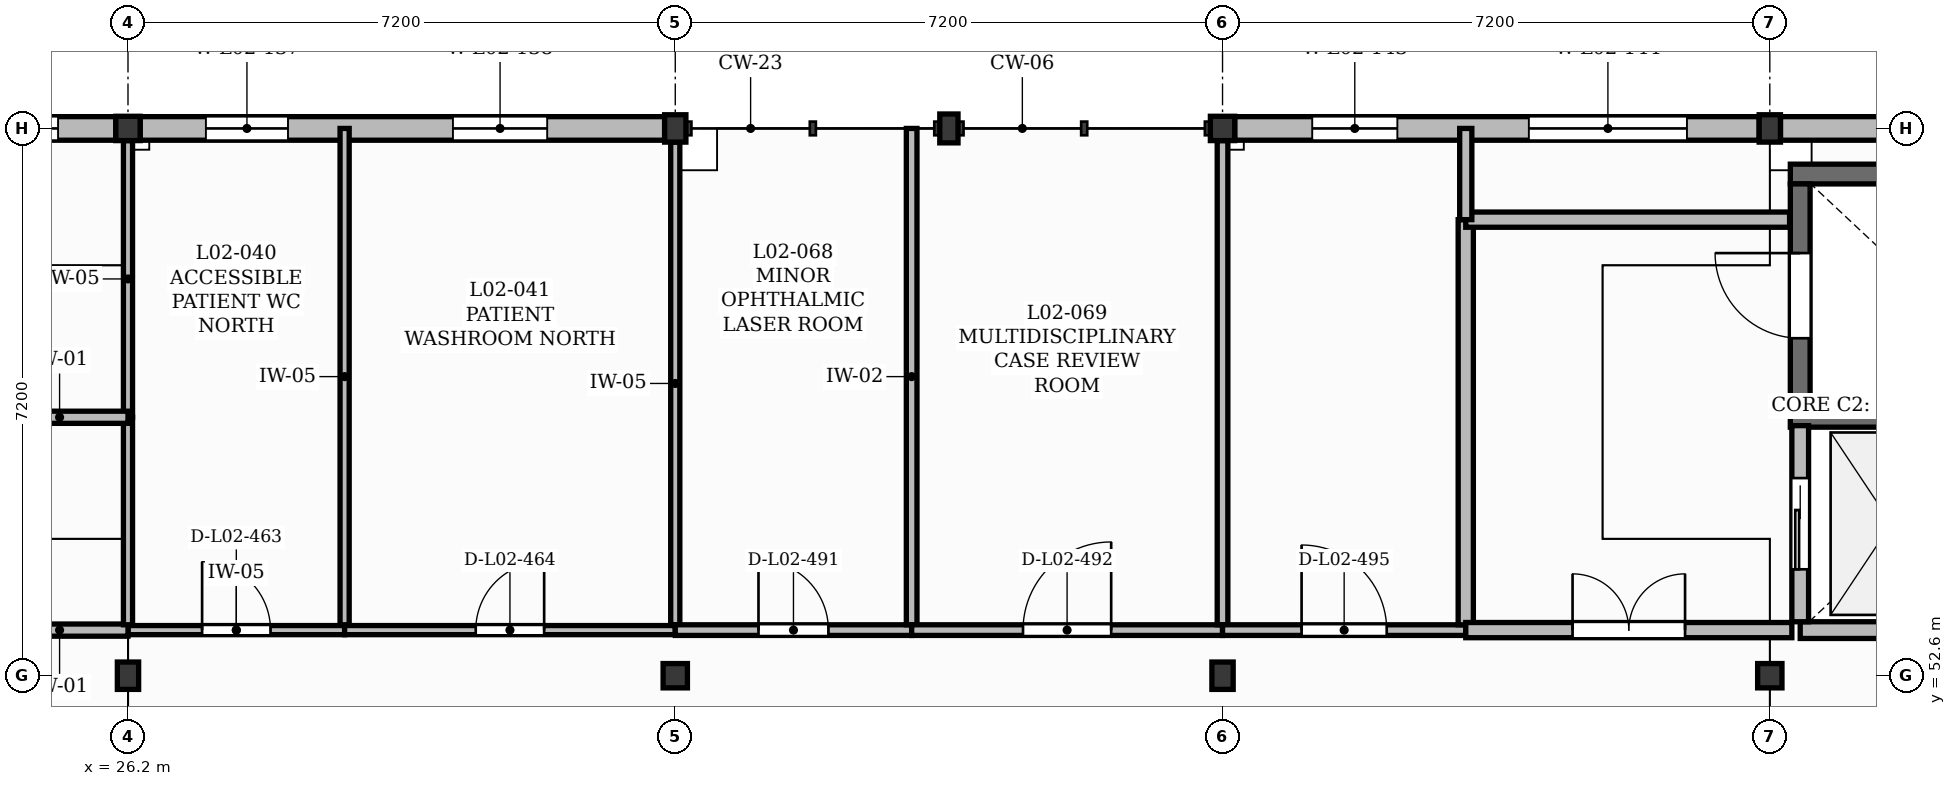
"""IFC4 building model, lengths in metres.
Left out: names, types, materials, properties, quantities, classifications, styles, units other than length and angle.
Written with IfcOpenShell. Run it as: python <this file> out.ifc"""

import sys

from ifc_helpers import new_model, si_unit, direction, frame, frame_2d, origin, origin_2d, place, context, subcontext, project, spatial, rectangle, extrude, element, fill, save


model = new_model("IFC4")
c1 = context("Model", 3, precision=1e-05, world=origin(), true_north=direction((0.0, 1.0)))
c2 = subcontext(c1, "Body", "Model", "MODEL_VIEW")
j1 = project(units=[si_unit("LENGTHUNIT", "METRE"), si_unit("PLANEANGLEUNIT", "RADIAN")], contexts=[c1])
p1 = place(None, origin())
s1 = spatial("IfcSite", under=j1, at=p1, CompositionType="ELEMENT")
p2 = place(p1, origin())
s2 = spatial("IfcBuilding", under=s1, at=p2, CompositionType="ELEMENT")
p3 = place(p2, frame((0.0, 0.0, 9.0)))
s3 = spatial("IfcBuildingStorey", under=s2, at=p3, CompositionType="ELEMENT", Elevation=9.0)
p4 = place(p3, frame((26.2, 52.6, 0.0), z_axis=(0.0, 0.0, 1.0), x_axis=(1.0, 0.0, 0.0)))
e1 = element("IfcColumn", 1, at=p4, inside=s3, PredefinedType="COLUMN", context=c2, shape_type="SweptSolid", body=[
    extrude(rectangle(XDim=0.28, YDim=0.36, at=origin_2d()), origin(), (0.0, 0.0, 1.0), 3.99),
])
for number, where, z_axis, x_axis in (
    (2, (26.2, 59.8, 0.0), (0.0, 0.0, 1.0), (1.0, 0.0, 0.0)),
    (3, (33.4, 52.6, 0.0), (0.0, 0.0, 1.0), (1.0, 0.0, 0.0)),
):
    element("IfcColumn", number, at=place(p3, frame(where, z_axis=z_axis, x_axis=x_axis)), inside=s3, PredefinedType="COLUMN", context=c2, shape_type="SweptSolid", body=[
        extrude(rectangle(XDim=0.32, YDim=0.32, at=origin_2d()), origin(), (0.0, 0.0, 1.0), 3.99),
    ])
for number, where, z_axis, x_axis in (
    (4, (33.4, 59.8, 0.0), (0.0, 0.0, 1.0), (1.0, 0.0, 0.0)),
    (5, (40.6, 52.6, 0.0), (0.0, 0.0, 1.0), (1.0, 0.0, 0.0)),
):
    element("IfcColumn", number, at=place(p3, frame(where, z_axis=z_axis, x_axis=x_axis)), inside=s3, PredefinedType="COLUMN", context=c2, shape_type="SweptSolid", body=[
        extrude(rectangle(XDim=0.28, YDim=0.36, at=origin_2d()), origin(), (0.0, 0.0, 1.0), 3.99),
    ])
for number, where, z_axis, x_axis in (
    (6, (40.6, 59.8, 0.0), (0.0, 0.0, 1.0), (1.0, 0.0, 0.0)),
    (7, (47.8, 52.6, 0.0), (0.0, 0.0, 1.0), (1.0, 0.0, 0.0)),
):
    element("IfcColumn", number, at=place(p3, frame(where, z_axis=z_axis, x_axis=x_axis)), inside=s3, PredefinedType="COLUMN", context=c2, shape_type="SweptSolid", body=[
        extrude(rectangle(XDim=0.32, YDim=0.32, at=origin_2d()), origin(), (0.0, 0.0, 1.0), 3.99),
    ])
p5 = place(p3, frame((47.8, 59.8, 0.0), z_axis=(0.0, 0.0, 1.0), x_axis=(1.0, 0.0, 0.0)))
e8 = element("IfcColumn", 8, at=p5, inside=s3, PredefinedType="COLUMN", context=c2, shape_type="SweptSolid", body=[
    extrude(rectangle(XDim=0.28, YDim=0.36, at=origin_2d()), origin(), (0.0, 0.0, 1.0), 3.99),
])
p6 = place(p3, frame((37.0, 59.8, 0.0), z_axis=(0.0, 0.0, 1.0), x_axis=(1.0, 0.0, 0.0)))
e9 = element("IfcColumn", 9, at=p6, inside=s3, PredefinedType="PILASTER", context=c2, shape_type="SweptSolid", body=[
    extrude(rectangle(XDim=0.24, YDim=0.38, at=origin_2d()), origin(), (0.0, 0.0, 1.0), 3.99),
])
p7 = place(p3, frame((22.72, 59.8, 0.0), z_axis=(0.0, 0.0, 1.0), x_axis=(1.0, 0.0, 0.0)))
e10 = element("IfcWall", 10, at=p7, inside=s3, PredefinedType="SOLIDWALL", context=c2, shape_type="SweptSolid", body=[
    extrude(rectangle(XDim=3.32, YDim=0.31, at=frame_2d((1.66, 0.0))), origin(), (0.0, 0.0, 1.0), 3.53),
])
p8 = place(p7, frame((0.76, 0.0, 1.0)))
e11 = element("IfcOpeningElement", 11, at=p8, cuts=e10, PredefinedType="OPENING", context=c2, shape_type="SweptSolid", body=[
    extrude(rectangle(XDim=1.8, YDim=1.8, at=frame_2d((0.9, 0.9))), frame((0.0, 0.165, 0.0), z_axis=(0.0, -1.0, 0.0), x_axis=(1.0, 0.0, 0.0)), (0.0, 0.0, 1.0), 0.33),
])
p9 = place(p3, frame((26.36, 59.8, 0.0), z_axis=(0.0, 0.0, 1.0), x_axis=(1.0, 0.0, 0.0)))
e12 = element("IfcWall", 12, at=p9, inside=s3, PredefinedType="SOLIDWALL", context=c2, shape_type="SweptSolid", body=[
    extrude(rectangle(XDim=6.9, YDim=0.31, at=frame_2d((3.45, 0.0))), origin(), (0.0, 0.0, 1.0), 3.53),
])
p10 = place(p9, frame((0.865, 0.0, 1.0)))
e13 = element("IfcOpeningElement", 13, at=p10, cuts=e12, PredefinedType="OPENING", context=c2, shape_type="SweptSolid", body=[
    extrude(rectangle(XDim=1.08, YDim=1.95, at=frame_2d((0.54, 0.975))), frame((0.0, 0.165, 0.0), z_axis=(0.0, -1.0, 0.0), x_axis=(1.0, 0.0, 0.0)), (0.0, 0.0, 1.0), 0.33),
])
p11 = place(p9, frame((4.115, 0.0, 1.0)))
e14 = element("IfcOpeningElement", 14, at=p11, cuts=e12, PredefinedType="OPENING", context=c2, shape_type="SweptSolid", body=[
    extrude(rectangle(XDim=1.24, YDim=1.8, at=frame_2d((0.62, 0.9))), frame((0.0, 0.165, 0.0), z_axis=(0.0, -1.0, 0.0), x_axis=(1.0, 0.0, 0.0)), (0.0, 0.0, 1.0), 0.33),
])
p12 = place(p3, frame((40.76, 59.8, 0.0), z_axis=(0.0, 0.0, 1.0), x_axis=(1.0, 0.0, 0.0)))
e15 = element("IfcWall", 15, at=p12, inside=s3, PredefinedType="SOLIDWALL", context=c2, shape_type="SweptSolid", body=[
    extrude(rectangle(XDim=6.9, YDim=0.31, at=frame_2d((3.45, 0.0))), origin(), (0.0, 0.0, 1.0), 3.53),
])
p13 = place(p12, frame((1.02, 0.0, 1.05)))
e16 = element("IfcOpeningElement", 16, at=p13, cuts=e15, PredefinedType="OPENING", context=c2, shape_type="SweptSolid", body=[
    extrude(rectangle(XDim=1.12, YDim=1.65, at=frame_2d((0.56, 0.825))), frame((0.0, 0.165, 0.0), z_axis=(0.0, -1.0, 0.0), x_axis=(1.0, 0.0, 0.0)), (0.0, 0.0, 1.0), 0.33),
])
p14 = place(p12, frame((3.87, 0.0, 1.0)))
e17 = element("IfcOpeningElement", 17, at=p14, cuts=e15, PredefinedType="OPENING", context=c2, shape_type="SweptSolid", body=[
    extrude(rectangle(XDim=2.08, YDim=1.8, at=frame_2d((1.04, 0.9))), frame((0.0, 0.165, 0.0), z_axis=(0.0, -1.0, 0.0), x_axis=(1.0, 0.0, 0.0)), (0.0, 0.0, 1.0), 0.33),
])
p15 = place(p3, frame((47.94, 59.8, 0.0), z_axis=(0.0, 0.0, 1.0), x_axis=(1.0, 0.0, 0.0)))
e18 = element("IfcWall", 18, at=p15, inside=s3, PredefinedType="SOLIDWALL", context=c2, shape_type="SweptSolid", body=[
    extrude(rectangle(XDim=3.34, YDim=0.31, at=frame_2d((1.67, 0.0))), origin(), (0.0, 0.0, 1.0), 3.53),
])
for number, where, z_axis, x_axis in (
    (19, (48.07, 56.0, 0.0), (0.0, 0.0, 1.0), (1.0, 0.0, 0.0)),
    (20, (48.07, 59.2, 0.0), (0.0, 0.0, 1.0), (1.0, 0.0, 0.0)),
):
    element("IfcWall", number, at=place(p3, frame(where, z_axis=z_axis, x_axis=x_axis)), inside=s3, PredefinedType="SHEAR", context=c2, shape_type="SweptSolid", body=[
        extrude(rectangle(XDim=6.66, YDim=0.26, at=frame_2d((3.33, 0.0))), origin(), (0.0, 0.0, 1.0), 3.95),
    ])
p16 = place(p3, frame((48.2, 56.13, 0.0), z_axis=(0.0, 0.0, 1.0), x_axis=(0.0, 1.0, 0.0)))
e21 = element("IfcWall", 21, at=p16, inside=s3, PredefinedType="SHEAR", context=c2, shape_type="SweptSolid", body=[
    extrude(rectangle(XDim=2.94, YDim=0.26, at=frame_2d((1.47, 0.0))), origin(), (0.0, 0.0, 1.0), 3.95),
])
p17 = place(p16, frame((0.91, 0.0, 0.0)))
e22 = element("IfcOpeningElement", 22, at=p17, cuts=e21, PredefinedType="OPENING", context=c2, shape_type="SweptSolid", body=[
    extrude(rectangle(XDim=1.12, YDim=2.1, at=frame_2d((0.56, 1.05))), frame((0.0, 0.14, 0.0), z_axis=(0.0, -1.0, 0.0), x_axis=(1.0, 0.0, 0.0)), (0.0, 0.0, 1.0), 0.28),
])
p18 = place(p3, frame((48.2, 53.2, 0.0), z_axis=(0.0, 0.0, 1.0), x_axis=(1.0, 0.0, 0.0)))
e23 = element("IfcWall", 23, at=p18, inside=s3, PredefinedType="SOLIDWALL", context=c2, shape_type="SweptSolid", body=[
    extrude(rectangle(XDim=2.4, YDim=0.22, at=frame_2d((1.2, 0.0))), origin(), (0.0, 0.0, 1.0), 3.95),
])
p19 = place(p3, frame((48.2, 53.31, 0.0), z_axis=(0.0, 0.0, 1.0), x_axis=(0.0, 1.0, 0.0)))
e24 = element("IfcWall", 24, at=p19, inside=s3, PredefinedType="SOLIDWALL", context=c2, shape_type="SweptSolid", body=[
    extrude(rectangle(XDim=2.58, YDim=0.22, at=frame_2d((1.29, 0.0))), origin(), (0.0, 0.0, 1.0), 3.95),
])
p20 = place(p19, frame((0.69, 0.0, 0.0)))
e25 = element("IfcOpeningElement", 25, at=p20, cuts=e24, PredefinedType="OPENING", context=c2, shape_type="SweptSolid", body=[
    extrude(rectangle(XDim=1.2, YDim=2.15, at=frame_2d((0.6, 1.075))), frame((0.0, 0.12, 0.0), z_axis=(0.0, -1.0, 0.0), x_axis=(1.0, 0.0, 0.0)), (0.0, 0.0, 1.0), 0.24),
])
p21 = place(p3, frame((26.2, 53.2, 0.0), z_axis=(0.0, 0.0, 1.0), x_axis=(1.0, 0.0, 0.0)))
e26 = element("IfcWall", 26, at=p21, inside=s3, PredefinedType="PLUMBINGWALL", context=c2, shape_type="SweptSolid", body=[
    extrude(rectangle(XDim=2.85, YDim=0.12, at=frame_2d((1.425, 0.0))), origin(), (0.0, 0.0, 1.0), 3.96),
])
p22 = place(p21, frame((0.975, 0.0, 0.0)))
e27 = element("IfcOpeningElement", 27, at=p22, cuts=e26, PredefinedType="OPENING", context=c2, shape_type="SweptSolid", body=[
    extrude(rectangle(XDim=0.9, YDim=2.1, at=frame_2d((0.45, 1.05))), frame((0.0, 0.07, 0.0), z_axis=(0.0, -1.0, 0.0), x_axis=(1.0, 0.0, 0.0)), (0.0, 0.0, 1.0), 0.14),
])
p23 = place(p3, frame((26.2, 56.0, 0.0), z_axis=(0.0, 0.0, 1.0), x_axis=(0.0, 1.0, 0.0)))
e28 = element("IfcWall", 28, at=p23, inside=s3, PredefinedType="PLUMBINGWALL", context=c2, shape_type="SweptSolid", body=[
    extrude(rectangle(XDim=3.64, YDim=0.12, at=frame_2d((1.82, 0.0))), origin(), (0.0, 0.0, 1.0), 3.47),
])
p24 = place(p3, frame((29.05, 53.27, 0.0), z_axis=(0.0, 0.0, 1.0), x_axis=(0.0, 1.0, 0.0)))
e29 = element("IfcWall", 29, at=p24, inside=s3, PredefinedType="PLUMBINGWALL", context=c2, shape_type="SweptSolid", body=[
    extrude(rectangle(XDim=6.53, YDim=0.12, at=frame_2d((3.265, 0.0))), origin(), (0.0, 0.0, 1.0), 3.96),
])
p25 = place(p3, frame((29.05, 53.2, 0.0), z_axis=(0.0, 0.0, 1.0), x_axis=(1.0, 0.0, 0.0)))
e30 = element("IfcWall", 30, at=p25, inside=s3, PredefinedType="PLUMBINGWALL", context=c2, shape_type="SweptSolid", body=[
    extrude(rectangle(XDim=4.35, YDim=0.12, at=frame_2d((2.175, 0.0))), origin(), (0.0, 0.0, 1.0), 3.96),
])
p26 = place(p25, frame((1.725, 0.0, 0.0)))
e31 = element("IfcOpeningElement", 31, at=p26, cuts=e30, PredefinedType="OPENING", context=c2, shape_type="SweptSolid", body=[
    extrude(rectangle(XDim=0.9, YDim=2.1, at=frame_2d((0.45, 1.05))), frame((0.0, 0.07, 0.0), z_axis=(0.0, -1.0, 0.0), x_axis=(1.0, 0.0, 0.0)), (0.0, 0.0, 1.0), 0.14),
])
p27 = place(p3, frame((33.4, 53.27, 0.0), z_axis=(0.0, 0.0, 1.0), x_axis=(0.0, 1.0, 0.0)))
e32 = element("IfcWall", 32, at=p27, inside=s3, PredefinedType="PLUMBINGWALL", context=c2, shape_type="SweptSolid", body=[
    extrude(rectangle(XDim=6.35, YDim=0.12, at=frame_2d((3.175, 0.0))), origin(), (0.0, 0.0, 1.0), 3.47),
])
p28 = place(p3, frame((33.4, 53.2, 0.0), z_axis=(0.0, 0.0, 1.0), x_axis=(1.0, 0.0, 0.0)))
e33 = element("IfcWall", 33, at=p28, inside=s3, PredefinedType="PARTITIONING", context=c2, shape_type="SweptSolid", body=[
    extrude(rectangle(XDim=3.11, YDim=0.14, at=frame_2d((1.555, 0.0))), origin(), (0.0, 0.0, 1.0), 3.96),
])
p29 = place(p28, frame((1.095, 0.0, 0.0)))
e34 = element("IfcOpeningElement", 34, at=p29, cuts=e33, PredefinedType="OPENING", context=c2, shape_type="SweptSolid", body=[
    extrude(rectangle(XDim=0.92, YDim=2.1, at=frame_2d((0.46, 1.05))), frame((0.0, 0.08, 0.0), z_axis=(0.0, -1.0, 0.0), x_axis=(1.0, 0.0, 0.0)), (0.0, 0.0, 1.0), 0.16),
])
p30 = place(p3, frame((36.51, 53.27, 0.0), z_axis=(0.0, 0.0, 1.0), x_axis=(0.0, 1.0, 0.0)))
e35 = element("IfcWall", 35, at=p30, inside=s3, PredefinedType="PARTITIONING", context=c2, shape_type="SweptSolid", body=[
    extrude(rectangle(XDim=6.53, YDim=0.14, at=frame_2d((3.265, 0.0))), origin(), (0.0, 0.0, 1.0), 3.96),
])
p31 = place(p3, frame((36.51, 53.2, 0.0), z_axis=(0.0, 0.0, 1.0), x_axis=(1.0, 0.0, 0.0)))
e36 = element("IfcWall", 36, at=p31, inside=s3, PredefinedType="PARTITIONING", context=c2, shape_type="SweptSolid", body=[
    extrude(rectangle(XDim=4.09, YDim=0.14, at=frame_2d((2.045, 0.0))), origin(), (0.0, 0.0, 1.0), 3.96),
])
p32 = place(p31, frame((1.465, 0.0, 0.0)))
e37 = element("IfcOpeningElement", 37, at=p32, cuts=e36, PredefinedType="OPENING", context=c2, shape_type="SweptSolid", body=[
    extrude(rectangle(XDim=1.16, YDim=2.1, at=frame_2d((0.58, 1.05))), frame((0.0, 0.08, 0.0), z_axis=(0.0, -1.0, 0.0), x_axis=(1.0, 0.0, 0.0)), (0.0, 0.0, 1.0), 0.16),
])
p33 = place(p3, frame((40.6, 53.27, 0.0), z_axis=(0.0, 0.0, 1.0), x_axis=(0.0, 1.0, 0.0)))
e38 = element("IfcWall", 38, at=p33, inside=s3, PredefinedType="PARTITIONING", context=c2, shape_type="SweptSolid", body=[
    extrude(rectangle(XDim=6.37, YDim=0.14, at=frame_2d((3.185, 0.0))), origin(), (0.0, 0.0, 1.0), 3.47),
])
p34 = place(p3, frame((40.6, 53.2, 0.0), z_axis=(0.0, 0.0, 1.0), x_axis=(1.0, 0.0, 0.0)))
e39 = element("IfcWall", 39, at=p34, inside=s3, PredefinedType="PARTITIONING", context=c2, shape_type="SweptSolid", body=[
    extrude(rectangle(XDim=3.2, YDim=0.14, at=frame_2d((1.6, 0.0))), origin(), (0.0, 0.0, 1.0), 3.96),
])
p35 = place(p34, frame((1.04, 0.0, 0.0)))
e40 = element("IfcOpeningElement", 40, at=p35, cuts=e39, PredefinedType="OPENING", context=c2, shape_type="SweptSolid", body=[
    extrude(rectangle(XDim=1.12, YDim=2.15, at=frame_2d((0.56, 1.075))), frame((0.0, 0.08, 0.0), z_axis=(0.0, -1.0, 0.0), x_axis=(1.0, 0.0, 0.0)), (0.0, 0.0, 1.0), 0.16),
])
p36 = place(p3, frame((43.8, 53.27, 0.0), z_axis=(0.0, 0.0, 1.0), x_axis=(0.0, 1.0, 0.0)))
e41 = element("IfcWall", 41, at=p36, inside=s3, PredefinedType="PARTITIONING", context=c2, shape_type="SweptSolid", body=[
    extrude(rectangle(XDim=5.33, YDim=0.2, at=frame_2d((2.665, 0.0))), origin(), (0.0, 0.0, 1.0), 3.96),
])
p37 = place(p3, frame((43.8, 53.2, 0.0), z_axis=(0.0, 0.0, 1.0), x_axis=(1.0, 0.0, 0.0)))
e42 = element("IfcWall", 42, at=p37, inside=s3, PredefinedType="PARTITIONING", context=c2, shape_type="SweptSolid", body=[
    extrude(rectangle(XDim=4.29, YDim=0.2, at=frame_2d((2.145, 0.0))), origin(), (0.0, 0.0, 1.0), 3.96),
])
p38 = place(p37, frame((1.405, 0.0, 0.0)))
e43 = element("IfcOpeningElement", 43, at=p38, cuts=e42, PredefinedType="OPENING", context=c2, shape_type="SweptSolid", body=[
    extrude(rectangle(XDim=1.48, YDim=2.25, at=frame_2d((0.74, 1.125))), frame((0.0, 0.11, 0.0), z_axis=(0.0, -1.0, 0.0), x_axis=(1.0, 0.0, 0.0)), (0.0, 0.0, 1.0), 0.22),
])
p39 = place(p3, frame((48.06, 58.6, 0.0), z_axis=(0.0, 0.0, 1.0), x_axis=(-1.0, 0.0, 0.0)))
e44 = element("IfcWall", 44, at=p39, inside=s3, PredefinedType="PARTITIONING", context=c2, shape_type="SweptSolid", body=[
    extrude(rectangle(XDim=4.26, YDim=0.2, at=frame_2d((2.13, 0.0))), origin(), (0.0, 0.0, 1.0), 3.96),
])
p40 = place(p3, frame((26.2, 53.2, 0.0), z_axis=(0.0, 0.0, 1.0), x_axis=(-1.0, 0.0, 0.0)))
e45 = element("IfcWall", 45, at=p40, inside=s3, PredefinedType="PARTITIONING", context=c2, shape_type="SweptSolid", body=[
    extrude(rectangle(XDim=1.8, YDim=0.16, at=frame_2d((0.9, 0.0))), origin(), (0.0, 0.0, 1.0), 3.96),
])
p41 = place(p3, frame((26.2, 53.27, 0.0), z_axis=(0.0, 0.0, 1.0), x_axis=(0.0, 1.0, 0.0)))
e46 = element("IfcWall", 46, at=p41, inside=s3, PredefinedType="PLUMBINGWALL", context=c2, shape_type="SweptSolid", body=[
    extrude(rectangle(XDim=2.73, YDim=0.12, at=frame_2d((1.365, 0.0))), origin(), (0.0, 0.0, 1.0), 3.47),
])
p42 = place(p3, frame((24.4, 56.0, 0.0), z_axis=(0.0, 0.0, 1.0), x_axis=(1.0, 0.0, 0.0)))
e47 = element("IfcWall", 47, at=p42, inside=s3, PredefinedType="PARTITIONING", context=c2, shape_type="SweptSolid", body=[
    extrude(rectangle(XDim=1.8, YDim=0.16, at=frame_2d((0.9, 0.0))), origin(), (0.0, 0.0, 1.0), 3.96),
])
p43 = place(p3, frame((43.8, 58.6, 0.0), z_axis=(0.0, 0.0, 1.0), x_axis=(0.0, 1.0, 0.0)))
e48 = element("IfcWall", 48, at=p43, inside=s3, PredefinedType="PARTITIONING", context=c2, shape_type="SweptSolid", body=[
    extrude(rectangle(XDim=1.2, YDim=0.16, at=frame_2d((0.6, 0.0))), origin(), (0.0, 0.0, 1.0), 3.96),
])
p44 = place(p8, origin())
e49 = element("IfcWindow", 49, at=p44, inside=s3, PartitioningType="DOUBLE_PANEL_VERTICAL", PredefinedType="WINDOW", context=c2, shape_type="SweptSolid", body=[
    extrude(rectangle(XDim=1.8, YDim=1.8, at=frame_2d((0.9, 0.9))), frame((0.0, 0.03, 0.0), z_axis=(0.0, -1.0, 0.0), x_axis=(1.0, 0.0, 0.0)), (0.0, 0.0, 1.0), 0.06),
])
fill(e11, e49)
p45 = place(p10, origin())
e50 = element("IfcWindow", 50, at=p45, inside=s3, PartitioningType="SINGLE_PANEL", PredefinedType="WINDOW", context=c2, shape_type="SweptSolid", body=[
    extrude(rectangle(XDim=1.08, YDim=1.95, at=frame_2d((0.54, 0.975))), frame((0.0, 0.03, 0.0), z_axis=(0.0, -1.0, 0.0), x_axis=(1.0, 0.0, 0.0)), (0.0, 0.0, 1.0), 0.06),
])
fill(e13, e50)
p46 = place(p11, origin())
e51 = element("IfcWindow", 51, at=p46, inside=s3, PartitioningType="SINGLE_PANEL", PredefinedType="WINDOW", context=c2, shape_type="SweptSolid", body=[
    extrude(rectangle(XDim=1.24, YDim=1.8, at=frame_2d((0.62, 0.9))), frame((0.0, 0.03, 0.0), z_axis=(0.0, -1.0, 0.0), x_axis=(1.0, 0.0, 0.0)), (0.0, 0.0, 1.0), 0.06),
])
fill(e14, e51)
p47 = place(p13, origin())
e52 = element("IfcWindow", 52, at=p47, inside=s3, PartitioningType="SINGLE_PANEL", PredefinedType="WINDOW", context=c2, shape_type="SweptSolid", body=[
    extrude(rectangle(XDim=1.12, YDim=1.65, at=frame_2d((0.56, 0.825))), frame((0.0, 0.03, 0.0), z_axis=(0.0, -1.0, 0.0), x_axis=(1.0, 0.0, 0.0)), (0.0, 0.0, 1.0), 0.06),
])
fill(e16, e52)
p48 = place(p14, origin())
e53 = element("IfcWindow", 53, at=p48, inside=s3, PartitioningType="DOUBLE_PANEL_VERTICAL", PredefinedType="WINDOW", context=c2, shape_type="SweptSolid", body=[
    extrude(rectangle(XDim=2.08, YDim=1.8, at=frame_2d((1.04, 0.9))), frame((0.0, 0.03, 0.0), z_axis=(0.0, -1.0, 0.0), x_axis=(1.0, 0.0, 0.0)), (0.0, 0.0, 1.0), 0.06),
])
fill(e17, e53)
p49 = place(p20, origin())
e54 = element("IfcDoor", 54, at=p49, inside=s3, OperationType="SLIDING_TO_LEFT", PredefinedType="DOOR", context=c2, shape_type="SweptSolid", body=[
    extrude(rectangle(XDim=1.2, YDim=2.15, at=frame_2d((0.6, 1.075))), frame((0.0, 0.025, 0.0), z_axis=(0.0, -1.0, 0.0), x_axis=(1.0, 0.0, 0.0)), (0.0, 0.0, 1.0), 0.05),
])
fill(e25, e54)
p50 = place(p17, origin())
e55 = element("IfcDoor", 55, at=p50, inside=s3, OperationType="SINGLE_SWING_RIGHT", PredefinedType="DOOR", context=c2, shape_type="SweptSolid", body=[
    extrude(rectangle(XDim=1.12, YDim=2.1, at=frame_2d((0.56, 1.05))), frame((0.0, 0.025, 0.0), z_axis=(0.0, -1.0, 0.0), x_axis=(1.0, 0.0, 0.0)), (0.0, 0.0, 1.0), 0.05),
])
fill(e22, e55)
p51 = place(p38, origin())
e56 = element("IfcDoor", 56, at=p51, inside=s3, OperationType="DOUBLE_DOOR_SINGLE_SWING", PredefinedType="DOOR", context=c2, shape_type="SweptSolid", body=[
    extrude(rectangle(XDim=1.48, YDim=2.25, at=frame_2d((0.74, 1.125))), frame((0.0, 0.025, 0.0), z_axis=(0.0, -1.0, 0.0), x_axis=(1.0, 0.0, 0.0)), (0.0, 0.0, 1.0), 0.05),
])
fill(e43, e56)
p52 = place(p22, origin())
e57 = element("IfcDoor", 57, at=p52, inside=s3, OperationType="SINGLE_SWING_LEFT", PredefinedType="DOOR", context=c2, shape_type="SweptSolid", body=[
    extrude(rectangle(XDim=0.9, YDim=2.1, at=frame_2d((0.45, 1.05))), frame((0.0, 0.025, 0.0), z_axis=(0.0, -1.0, 0.0), x_axis=(1.0, 0.0, 0.0)), (0.0, 0.0, 1.0), 0.05),
])
fill(e27, e57)
p53 = place(p26, origin())
e58 = element("IfcDoor", 58, at=p53, inside=s3, OperationType="SINGLE_SWING_RIGHT", PredefinedType="DOOR", context=c2, shape_type="SweptSolid", body=[
    extrude(rectangle(XDim=0.9, YDim=2.1, at=frame_2d((0.45, 1.05))), frame((0.0, 0.025, 0.0), z_axis=(0.0, -1.0, 0.0), x_axis=(1.0, 0.0, 0.0)), (0.0, 0.0, 1.0), 0.05),
])
fill(e31, e58)
p54 = place(p29, origin())
e59 = element("IfcDoor", 59, at=p54, inside=s3, OperationType="SINGLE_SWING_LEFT", PredefinedType="DOOR", context=c2, shape_type="SweptSolid", body=[
    extrude(rectangle(XDim=0.92, YDim=2.1, at=frame_2d((0.46, 1.05))), frame((0.0, 0.025, 0.0), z_axis=(0.0, -1.0, 0.0), x_axis=(1.0, 0.0, 0.0)), (0.0, 0.0, 1.0), 0.05),
])
fill(e34, e59)
p55 = place(p32, origin())
e60 = element("IfcDoor", 60, at=p55, inside=s3, OperationType="SINGLE_SWING_RIGHT", PredefinedType="DOOR", context=c2, shape_type="SweptSolid", body=[
    extrude(rectangle(XDim=1.16, YDim=2.1, at=frame_2d((0.58, 1.05))), frame((0.0, 0.025, 0.0), z_axis=(0.0, -1.0, 0.0), x_axis=(1.0, 0.0, 0.0)), (0.0, 0.0, 1.0), 0.05),
])
fill(e37, e60)
p56 = place(p35, origin())
e61 = element("IfcDoor", 61, at=p56, inside=s3, OperationType="SINGLE_SWING_LEFT", PredefinedType="DOOR", context=c2, shape_type="SweptSolid", body=[
    extrude(rectangle(XDim=1.12, YDim=2.15, at=frame_2d((0.56, 1.075))), frame((0.0, 0.025, 0.0), z_axis=(0.0, -1.0, 0.0), x_axis=(1.0, 0.0, 0.0)), (0.0, 0.0, 1.0), 0.05),
])
fill(e40, e61)
save(model, sys.argv[1])
